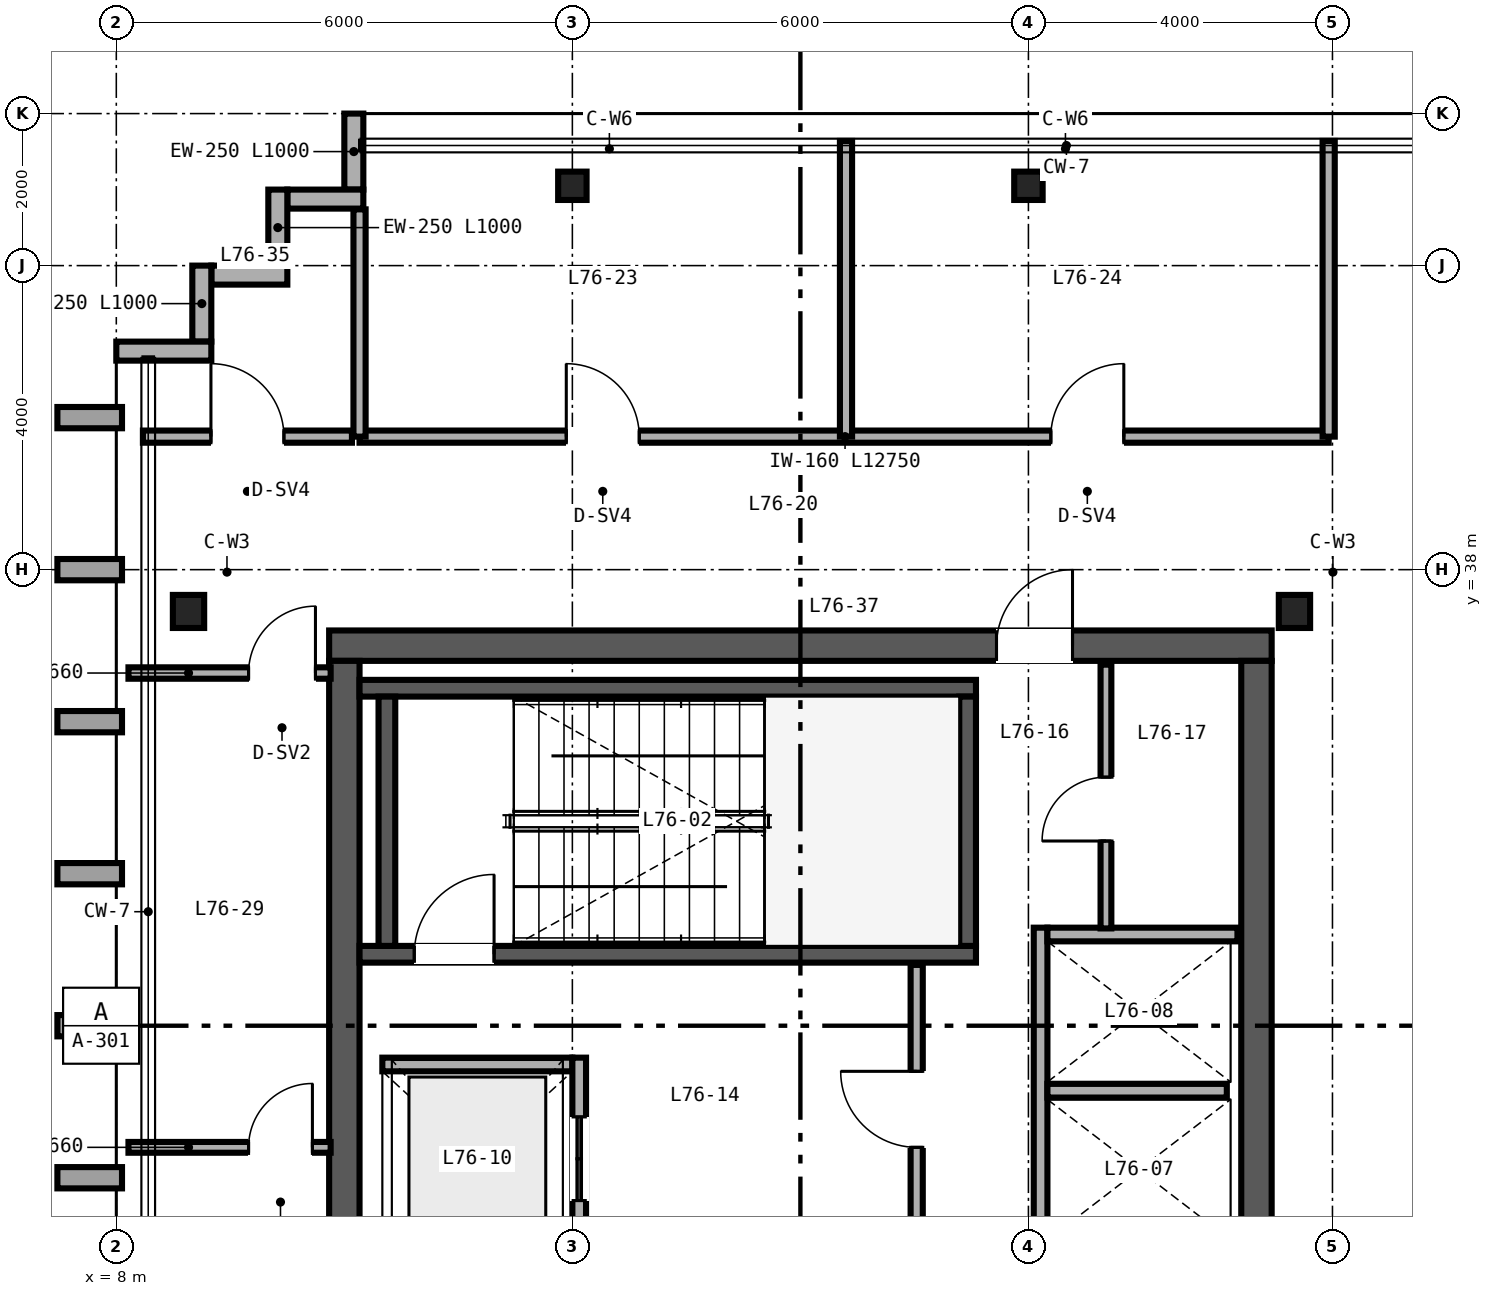
"""IFC4 building model, lengths in metres.
Left out: names, types, materials, properties, quantities, classifications, styles, units other than length and angle.
Written with IfcOpenShell. Run it as: python <this file> out.ifc"""

import sys

from ifc_helpers import new_model, si_unit, direction, frame, frame_2d, origin, origin_2d, place, context, subcontext, project, spatial, rectangle, i_section, extrude, source, transform, mapped, element, fill, save


model = new_model("IFC4")
c1 = context("Model", 3, precision=1e-05, world=origin(), true_north=direction((0.0, 1.0)))
c2 = subcontext(c1, "Body", "Model", "MODEL_VIEW")
j1 = project(units=[si_unit("LENGTHUNIT", "METRE"), si_unit("PLANEANGLEUNIT", "RADIAN")], contexts=[c1])
p1 = place(None, origin())
s1 = spatial("IfcSite", under=j1, at=p1, CompositionType="ELEMENT")
p2 = place(p1, origin())
s2 = spatial("IfcBuilding", under=s1, at=p2, CompositionType="ELEMENT")
p3 = place(p2, frame((0.0, 0.0, 297.6)))
s3 = spatial("IfcBuildingStorey", under=s2, at=p3, CompositionType="ELEMENT", Elevation=297.6)
p4 = place(p3, frame((10.8, 37.0, 0.0), z_axis=(0.0, 0.0, 1.0), x_axis=(1.0, 0.0, 0.0)))
e1 = element("IfcWall", 1, at=p4, inside=s3, PredefinedType="SHEAR", context=c2, shape_type="SweptSolid", body=[
    extrude(rectangle(XDim=12.4, YDim=0.4, at=frame_2d((6.2, 0.0))), origin(), (0.0, 0.0, 1.0), 3.32),
])
p5 = place(p4, frame((8.78, 0.0, 0.0)))
e2 = element("IfcOpeningElement", 2, at=p5, cuts=e1, PredefinedType="OPENING", context=c2, shape_type="SweptSolid", body=[
    extrude(rectangle(XDim=1.0, YDim=2.15, at=frame_2d((0.5, 1.075))), frame((0.0, 0.21, 0.0), z_axis=(0.0, -1.0, 0.0), x_axis=(1.0, 0.0, 0.0)), (0.0, 0.0, 1.0), 0.42),
])
for number, where, z_axis, x_axis in (
    (3, (11.0, 15.2, 0.0), (0.0, 0.0, 1.0), (0.0, 1.0, 0.0)),
    (4, (23.0, 15.2, 0.0), (0.0, 0.0, 1.0), (0.0, 1.0, 0.0)),
):
    element("IfcWall", number, at=place(p3, frame(where, z_axis=z_axis, x_axis=x_axis)), inside=s3, PredefinedType="SHEAR", context=c2, shape_type="SweptSolid", body=[
        extrude(rectangle(XDim=21.6, YDim=0.4, at=frame_2d((10.8, 0.0))), origin(), (0.0, 0.0, 1.0), 3.32),
    ])
p6 = place(p3, frame((11.2, 32.94, 0.0), z_axis=(0.0, 0.0, 1.0), x_axis=(1.0, 0.0, 0.0)))
e5 = element("IfcWall", 5, at=p6, inside=s3, PredefinedType="SHEAR", context=c2, shape_type="SweptSolid", body=[
    extrude(rectangle(XDim=8.11, YDim=0.22, at=frame_2d((4.055, 0.0))), origin(), (0.0, 0.0, 1.0), 3.4),
])
p7 = place(p6, frame((0.72, 0.0, 0.0)))
e6 = element("IfcOpeningElement", 6, at=p7, cuts=e5, PredefinedType="OPENING", context=c2, shape_type="SweptSolid", body=[
    extrude(rectangle(XDim=1.05, YDim=2.15, at=frame_2d((0.525, 1.075))), frame((0.0, 0.12, 0.0), z_axis=(0.0, -1.0, 0.0), x_axis=(1.0, 0.0, 0.0)), (0.0, 0.0, 1.0), 0.24),
])
p8 = place(p3, frame((11.2, 36.44, 0.0), z_axis=(0.0, 0.0, 1.0), x_axis=(1.0, 0.0, 0.0)))
e7 = element("IfcWall", 7, at=p8, inside=s3, PredefinedType="SHEAR", context=c2, shape_type="SweptSolid", body=[
    extrude(rectangle(XDim=8.11, YDim=0.22, at=frame_2d((4.055, 0.0))), origin(), (0.0, 0.0, 1.0), 3.4),
])
for number, where, z_axis, x_axis in (
    (8, (11.56, 33.05, 0.0), (0.0, 0.0, 1.0), (0.0, 1.0, 0.0)),
    (9, (19.2, 33.05, 0.0), (0.0, 0.0, 1.0), (0.0, 1.0, 0.0)),
):
    element("IfcWall", number, at=place(p3, frame(where, z_axis=z_axis, x_axis=x_axis)), inside=s3, PredefinedType="SHEAR", context=c2, shape_type="SweptSolid", body=[
        extrude(rectangle(XDim=3.28, YDim=0.22, at=frame_2d((1.64, 0.0))), origin(), (0.0, 0.0, 1.0), 3.4),
    ])
m1 = source(origin(), c2, "Body", "SweptSolid", [
    extrude(i_section(OverallWidth=0.412, OverallDepth=0.435, WebThickness=0.036, FlangeThickness=0.057, FilletRadius=0.025, at=origin_2d()), origin(), (0.0, 0.0, 1.0), 3.32),
])
for number, where, z_axis, x_axis in (
    (10, (8.95, 37.45, 0.0), (0.0, 0.0, 1.0), (1.0, 0.0, 0.0)),
    (11, (23.5, 37.45, 0.0), (0.0, 0.0, 1.0), (1.0, 0.0, 0.0)),
):
    element("IfcColumn", number, at=place(p3, frame(where, z_axis=z_axis, x_axis=x_axis)), inside=s3, PredefinedType="COLUMN", context=c2, shape_type="MappedRepresentation", body=[
        mapped(m1, transform((0.0, 0.0, 0.0), scale=1.0)),
    ])
m2 = source(origin(), c2, "Body", "SweptSolid", [
    extrude(i_section(OverallWidth=0.374, OverallDepth=0.373, WebThickness=0.016, FlangeThickness=0.026, FilletRadius=0.025, at=origin_2d()), origin(), (0.0, 0.0, 1.0), 3.32),
])
for number, where, z_axis, x_axis in (
    (12, (14.0, 43.05, 0.0), (0.0, 0.0, 1.0), (1.0, 0.0, 0.0)),
    (13, (20.0, 43.05, 0.0), (0.0, 0.0, 1.0), (1.0, 0.0, 0.0)),
):
    element("IfcColumn", number, at=place(p3, frame(where, z_axis=z_axis, x_axis=x_axis)), inside=s3, PredefinedType="COLUMN", context=c2, shape_type="MappedRepresentation", body=[
        mapped(m2, transform((0.0, 0.0, 0.0), scale=1.0)),
    ])
for number, where, z_axis, x_axis in (
    (14, (11.125, 44.0, 0.0), (0.0, 0.0, 1.0), (0.0, -1.0, 0.0)),
    (15, (11.25, 42.875, 0.0), (0.0, 0.0, 1.0), (-1.0, 0.0, 0.0)),
    (16, (10.125, 43.0, 0.0), (0.0, 0.0, 1.0), (0.0, -1.0, 0.0)),
    (17, (10.25, 41.875, 0.0), (0.0, 0.0, 1.0), (-1.0, 0.0, 0.0)),
    (18, (9.125, 42.0, 0.0), (0.0, 0.0, 1.0), (0.0, -1.0, 0.0)),
):
    element("IfcWall", number, at=place(p3, frame(where, z_axis=z_axis, x_axis=x_axis)), inside=s3, PredefinedType="SOLIDWALL", context=c2, shape_type="SweptSolid", body=[
        extrude(rectangle(XDim=1.0, YDim=0.25, at=frame_2d((0.5, 0.0))), origin(), (0.0, 0.0, 1.0), 3.32),
    ])
p9 = place(p3, frame((9.25, 40.875, 0.0), z_axis=(0.0, 0.0, 1.0), x_axis=(-1.0, 0.0, 0.0)))
e19 = element("IfcWall", 19, at=p9, inside=s3, PredefinedType="SOLIDWALL", context=c2, shape_type="SweptSolid", body=[
    extrude(rectangle(XDim=1.25, YDim=0.25, at=frame_2d((0.625, 0.0))), origin(), (0.0, 0.0, 1.0), 3.32),
])
p10 = place(p3, frame((20.16, 29.0, 0.0), z_axis=(0.0, 0.0, 1.0), x_axis=(0.0, 1.0, 0.0)))
e20 = element("IfcWall", 20, at=p10, inside=s3, PredefinedType="SOLIDWALL", context=c2, shape_type="SweptSolid", body=[
    extrude(rectangle(XDim=4.29, YDim=0.18, at=frame_2d((2.145, 0.0))), origin(), (0.0, 0.0, 1.0), 3.32),
])
p11 = place(p3, frame((20.25, 33.2, 0.0), z_axis=(0.0, 0.0, 1.0), x_axis=(1.0, 0.0, 0.0)))
e21 = element("IfcWall", 21, at=p11, inside=s3, PredefinedType="SOLIDWALL", context=c2, shape_type="SweptSolid", body=[
    extrude(rectangle(XDim=2.5, YDim=0.18, at=frame_2d((1.25, 0.0))), origin(), (0.0, 0.0, 1.0), 3.32),
])
p12 = place(p3, frame((20.25, 31.145, 0.0), z_axis=(0.0, 0.0, 1.0), x_axis=(1.0, 0.0, 0.0)))
e22 = element("IfcWall", 22, at=p12, inside=s3, PredefinedType="SOLIDWALL", context=c2, shape_type="SweptSolid", body=[
    extrude(rectangle(XDim=2.36, YDim=0.18, at=frame_2d((1.18, 0.0))), origin(), (0.0, 0.0, 1.0), 3.32),
])
p13 = place(p3, frame((11.5, 31.49, 0.0), z_axis=(0.0, 0.0, 1.0), x_axis=(1.0, 0.0, 0.0)))
e23 = element("IfcWall", 23, at=p13, inside=s3, PredefinedType="SOLIDWALL", context=c2, shape_type="SweptSolid", body=[
    extrude(rectangle(XDim=2.5, YDim=0.18, at=frame_2d((1.25, 0.0))), origin(), (0.0, 0.0, 1.0), 3.32),
])
p14 = place(p3, frame((14.09, 28.92, 0.0), z_axis=(0.0, 0.0, 1.0), x_axis=(0.0, 1.0, 0.0)))
e24 = element("IfcWall", 24, at=p14, inside=s3, PredefinedType="SOLIDWALL", context=c2, shape_type="SweptSolid", body=[
    extrude(rectangle(XDim=2.66, YDim=0.18, at=frame_2d((1.33, 0.0))), origin(), (0.0, 0.0, 1.0), 3.32),
])
p15 = place(p14, frame((0.78, 0.0, 0.0)))
e25 = element("IfcOpeningElement", 25, at=p15, cuts=e24, PredefinedType="OPENING", context=c2, shape_type="SweptSolid", body=[
    extrude(rectangle(XDim=1.1, YDim=2.2, at=frame_2d((0.55, 1.1))), frame((0.0, 0.1, 0.0), z_axis=(0.0, -1.0, 0.0), x_axis=(1.0, 0.0, 0.0)), (0.0, 0.0, 1.0), 0.2),
])
p16 = place(p3, frame((18.53, 28.9, 0.0), z_axis=(0.0, 0.0, 1.0), x_axis=(0.0, 1.0, 0.0)))
e26 = element("IfcWall", 26, at=p16, inside=s3, PredefinedType="PARTITIONING", context=c2, shape_type="SweptSolid", body=[
    extrude(rectangle(XDim=3.9, YDim=0.16, at=frame_2d((1.95, 0.0))), origin(), (0.0, 0.0, 1.0), 3.32),
])
p17 = place(p16, frame((1.5, 0.0, 0.0)))
e27 = element("IfcOpeningElement", 27, at=p17, cuts=e26, PredefinedType="OPENING", context=c2, shape_type="SweptSolid", body=[
    extrude(rectangle(XDim=1.0, YDim=2.15, at=frame_2d((0.5, 1.075))), frame((0.0, 0.09, 0.0), z_axis=(0.0, -1.0, 0.0), x_axis=(1.0, 0.0, 0.0)), (0.0, 0.0, 1.0), 0.18),
])
p18 = place(p3, frame((21.02, 33.28, 0.0), z_axis=(0.0, 0.0, 1.0), x_axis=(0.0, 1.0, 0.0)))
e28 = element("IfcWall", 28, at=p18, inside=s3, PredefinedType="PARTITIONING", context=c2, shape_type="SweptSolid", body=[
    extrude(rectangle(XDim=3.47, YDim=0.142, at=frame_2d((1.735, 0.0))), origin(), (0.0, 0.0, 1.0), 3.32),
])
p19 = place(p18, frame((1.15, 0.0, 0.0)))
e29 = element("IfcOpeningElement", 29, at=p19, cuts=e28, PredefinedType="OPENING", context=c2, shape_type="SweptSolid", body=[
    extrude(rectangle(XDim=0.84, YDim=2.1, at=frame_2d((0.42, 1.05))), frame((0.0, 0.081, 0.0), z_axis=(0.0, -1.0, 0.0), x_axis=(1.0, 0.0, 0.0)), (0.0, 0.0, 1.0), 0.162),
])
p20 = place(p3, frame((11.2, 39.75, 0.0), z_axis=(0.0, 0.0, 1.0), x_axis=(1.0, 0.0, 0.0)))
e30 = element("IfcWall", 30, at=p20, inside=s3, PredefinedType="PARTITIONING", context=c2, shape_type="SweptSolid", body=[
    extrude(rectangle(XDim=12.75, YDim=0.16, at=frame_2d((6.375, 0.0))), origin(), (0.0, 0.0, 1.0), 3.32),
])
p21 = place(p20, frame((2.72, 0.0, 0.0)))
e31 = element("IfcOpeningElement", 31, at=p21, cuts=e30, PredefinedType="OPENING", context=c2, shape_type="SweptSolid", body=[
    extrude(rectangle(XDim=0.96, YDim=2.15, at=frame_2d((0.48, 1.075))), frame((0.0, 0.09, 0.0), z_axis=(0.0, -1.0, 0.0), x_axis=(1.0, 0.0, 0.0)), (0.0, 0.0, 1.0), 0.18),
])
p22 = place(p20, frame((9.095, 0.0, 0.0)))
e32 = element("IfcOpeningElement", 32, at=p22, cuts=e30, PredefinedType="OPENING", context=c2, shape_type="SweptSolid", body=[
    extrude(rectangle(XDim=0.96, YDim=2.15, at=frame_2d((0.48, 1.075))), frame((0.0, 0.09, 0.0), z_axis=(0.0, -1.0, 0.0), x_axis=(1.0, 0.0, 0.0)), (0.0, 0.0, 1.0), 0.18),
])
p23 = place(p3, frame((11.2, 39.75, 0.0), z_axis=(0.0, 0.0, 1.0), x_axis=(0.0, 1.0, 0.0)))
e33 = element("IfcWall", 33, at=p23, inside=s3, PredefinedType="PARTITIONING", context=c2, shape_type="SweptSolid", body=[
    extrude(rectangle(XDim=2.99, YDim=0.16, at=frame_2d((1.495, 0.0))), origin(), (0.0, 0.0, 1.0), 3.32),
])
p24 = place(p3, frame((23.95, 39.75, 0.0), z_axis=(0.0, 0.0, 1.0), x_axis=(0.0, 1.0, 0.0)))
e34 = element("IfcWall", 34, at=p24, inside=s3, PredefinedType="PARTITIONING", context=c2, shape_type="SweptSolid", body=[
    extrude(rectangle(XDim=3.89, YDim=0.16, at=frame_2d((1.945, 0.0))), origin(), (0.0, 0.0, 1.0), 3.32),
])
p25 = place(p3, frame((17.6, 39.75, 0.0), z_axis=(0.0, 0.0, 1.0), x_axis=(0.0, 1.0, 0.0)))
e35 = element("IfcWall", 35, at=p25, inside=s3, PredefinedType="PARTITIONING", context=c2, shape_type="SweptSolid", body=[
    extrude(rectangle(XDim=3.89, YDim=0.16, at=frame_2d((1.945, 0.0))), origin(), (0.0, 0.0, 1.0), 2.627),
])
p26 = place(p3, frame((8.16, 36.64, 0.0), z_axis=(0.0, 0.0, 1.0), x_axis=(1.0, 0.0, 0.0)))
e36 = element("IfcWall", 36, at=p26, inside=s3, PredefinedType="PARTITIONING", context=c2, shape_type="SweptSolid", body=[
    extrude(rectangle(XDim=2.66, YDim=0.15, at=frame_2d((1.33, 0.0))), origin(), (0.0, 0.0, 1.0), 2.703),
])
p27 = place(p26, frame((1.58, 0.0, 0.0)))
e37 = element("IfcOpeningElement", 37, at=p27, cuts=e36, PredefinedType="OPENING", context=c2, shape_type="SweptSolid", body=[
    extrude(rectangle(XDim=0.88, YDim=2.15, at=frame_2d((0.44, 1.075))), frame((0.0, 0.085, 0.0), z_axis=(0.0, -1.0, 0.0), x_axis=(1.0, 0.0, 0.0)), (0.0, 0.0, 1.0), 0.17),
])
p28 = place(p3, frame((8.16, 30.4, 0.0), z_axis=(0.0, 0.0, 1.0), x_axis=(1.0, 0.0, 0.0)))
e38 = element("IfcWall", 38, at=p28, inside=s3, PredefinedType="PARTITIONING", context=c2, shape_type="SweptSolid", body=[
    extrude(rectangle(XDim=2.66, YDim=0.142, at=frame_2d((1.33, 0.0))), origin(), (0.0, 0.0, 1.0), 2.703),
])
p29 = place(p28, frame((1.58, 0.0, 0.0)))
e39 = element("IfcOpeningElement", 39, at=p29, cuts=e38, PredefinedType="OPENING", context=c2, shape_type="SweptSolid", body=[
    extrude(rectangle(XDim=0.84, YDim=2.1, at=frame_2d((0.42, 1.05))), frame((0.0, 0.081, 0.0), z_axis=(0.0, -1.0, 0.0), x_axis=(1.0, 0.0, 0.0)), (0.0, 0.0, 1.0), 0.162),
])
p30 = place(p3, frame((8.35, 39.75, 0.0), z_axis=(0.0, 0.0, 1.0), x_axis=(1.0, 0.0, 0.0)))
e40 = element("IfcWall", 40, at=p30, inside=s3, PredefinedType="PARTITIONING", context=c2, shape_type="SweptSolid", body=[
    extrude(rectangle(XDim=2.75, YDim=0.16, at=frame_2d((1.375, 0.0))), origin(), (0.0, 0.0, 1.0), 3.32),
])
p31 = place(p30, frame((0.895, 0.0, 0.0)))
e41 = element("IfcOpeningElement", 41, at=p31, cuts=e40, PredefinedType="OPENING", context=c2, shape_type="SweptSolid", body=[
    extrude(rectangle(XDim=0.96, YDim=2.15, at=frame_2d((0.48, 1.075))), frame((0.0, 0.09, 0.0), z_axis=(0.0, -1.0, 0.0), x_axis=(1.0, 0.0, 0.0)), (0.0, 0.0, 1.0), 0.18),
])
m3 = source(origin(), c2, "Body", "SweptSolid", [
    extrude(rectangle(XDim=1.05, YDim=2.15, at=frame_2d((0.525, 1.075))), frame((0.0, 0.025, 0.0), z_axis=(0.0, -1.0, 0.0), x_axis=(1.0, 0.0, 0.0)), (0.0, 0.0, 1.0), 0.05),
])
p32 = place(p7, origin())
e42 = element("IfcDoor", 42, at=p32, inside=s3, OperationType="SINGLE_SWING_RIGHT", PredefinedType="DOOR", context=c2, shape_type="MappedRepresentation", body=[
    mapped(m3, transform((0.0, 0.0, 0.0), scale=1.0)),
])
fill(e6, e42)
m4 = source(origin(), c2, "Body", "SweptSolid", [
    extrude(rectangle(XDim=1.1, YDim=2.2, at=frame_2d((0.55, 1.1))), frame((0.0, 0.025, 0.0), z_axis=(0.0, -1.0, 0.0), x_axis=(1.0, 0.0, 0.0)), (0.0, 0.0, 1.0), 0.05),
])
p33 = place(p15, origin())
e43 = element("IfcDoor", 43, at=p33, inside=s3, OperationType="DOUBLE_DOOR_SLIDING", PredefinedType="DOOR", context=c2, shape_type="MappedRepresentation", body=[
    mapped(m4, transform((0.0, 0.0, 0.0), scale=1.0)),
])
fill(e25, e43)
m5 = source(origin(), c2, "Body", "SweptSolid", [
    extrude(rectangle(XDim=1.0, YDim=2.15, at=frame_2d((0.5, 1.075))), frame((0.0, 0.025, 0.0), z_axis=(0.0, -1.0, 0.0), x_axis=(1.0, 0.0, 0.0)), (0.0, 0.0, 1.0), 0.05),
])
p34 = place(p17, origin())
e44 = element("IfcDoor", 44, at=p34, inside=s3, OperationType="SINGLE_SWING_RIGHT", PredefinedType="DOOR", context=c2, shape_type="MappedRepresentation", body=[
    mapped(m5, transform((0.0, 0.0, 0.0), scale=1.0)),
])
fill(e27, e44)
m6 = source(origin(), c2, "Body", "SweptSolid", [
    extrude(rectangle(XDim=0.84, YDim=2.1, at=frame_2d((0.42, 1.05))), frame((0.0, 0.025, 0.0), z_axis=(0.0, -1.0, 0.0), x_axis=(1.0, 0.0, 0.0)), (0.0, 0.0, 1.0), 0.05),
])
p35 = place(p19, origin())
e45 = element("IfcDoor", 45, at=p35, inside=s3, OperationType="SINGLE_SWING_LEFT", PredefinedType="DOOR", context=c2, shape_type="MappedRepresentation", body=[
    mapped(m6, transform((0.0, 0.0, 0.0), scale=1.0)),
])
fill(e29, e45)
p36 = place(p5, origin())
e46 = element("IfcDoor", 46, at=p36, inside=s3, OperationType="SINGLE_SWING_RIGHT", PredefinedType="DOOR", context=c2, shape_type="MappedRepresentation", body=[
    mapped(m5, transform((0.0, 0.0, 0.0), scale=1.0)),
])
fill(e2, e46)
m7 = source(origin(), c2, "Body", "SweptSolid", [
    extrude(rectangle(XDim=0.96, YDim=2.15, at=frame_2d((0.48, 1.075))), frame((0.0, 0.025, 0.0), z_axis=(0.0, -1.0, 0.0), x_axis=(1.0, 0.0, 0.0)), (0.0, 0.0, 1.0), 0.05),
])
p37 = place(p21, origin())
e47 = element("IfcDoor", 47, at=p37, inside=s3, OperationType="SINGLE_SWING_LEFT", PredefinedType="DOOR", context=c2, shape_type="MappedRepresentation", body=[
    mapped(m7, transform((0.0, 0.0, 0.0), scale=1.0)),
])
fill(e31, e47)
p38 = place(p22, origin())
e48 = element("IfcDoor", 48, at=p38, inside=s3, OperationType="SINGLE_SWING_RIGHT", PredefinedType="DOOR", context=c2, shape_type="MappedRepresentation", body=[
    mapped(m7, transform((0.0, 0.0, 0.0), scale=1.0)),
])
fill(e32, e48)
m8 = source(origin(), c2, "Body", "SweptSolid", [
    extrude(rectangle(XDim=0.88, YDim=2.15, at=frame_2d((0.44, 1.075))), frame((0.0, 0.025, 0.0), z_axis=(0.0, -1.0, 0.0), x_axis=(1.0, 0.0, 0.0)), (0.0, 0.0, 1.0), 0.05),
])
p39 = place(p27, origin())
e49 = element("IfcDoor", 49, at=p39, inside=s3, OperationType="SINGLE_SWING_RIGHT", PredefinedType="DOOR", context=c2, shape_type="MappedRepresentation", body=[
    mapped(m8, transform((0.0, 0.0, 0.0), scale=1.0)),
])
fill(e37, e49)
p40 = place(p29, origin())
e50 = element("IfcDoor", 50, at=p40, inside=s3, OperationType="SINGLE_SWING_RIGHT", PredefinedType="DOOR", context=c2, shape_type="MappedRepresentation", body=[
    mapped(m6, transform((0.0, 0.0, 0.0), scale=1.0)),
])
fill(e39, e50)
p41 = place(p31, origin())
e51 = element("IfcDoor", 51, at=p41, inside=s3, OperationType="SINGLE_SWING_LEFT", PredefinedType="DOOR", context=c2, shape_type="MappedRepresentation", body=[
    mapped(m7, transform((0.0, 0.0, 0.0), scale=1.0)),
])
fill(e41, e51)
save(model, sys.argv[1])
